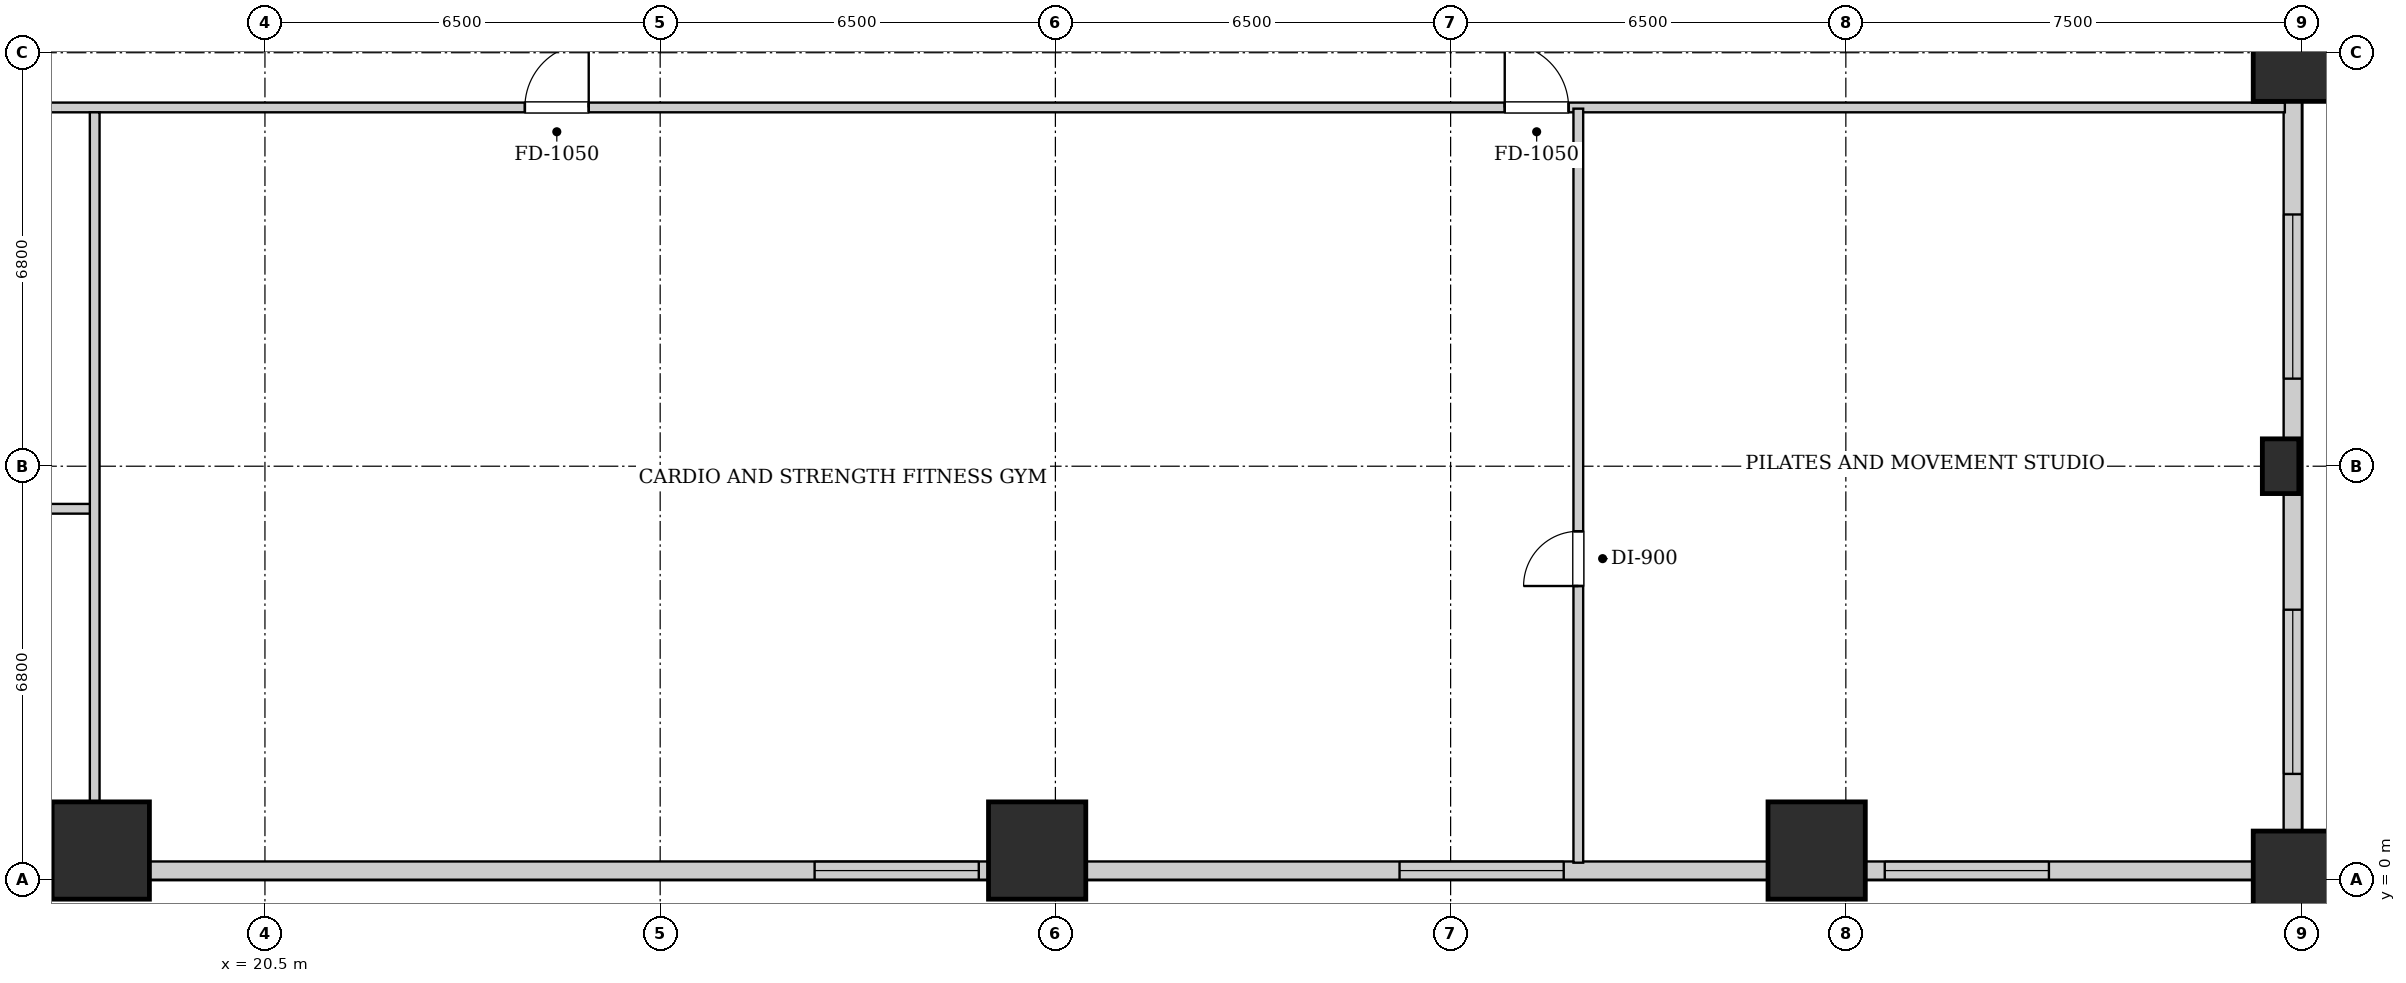
"""IFC4 building model, lengths in metres.
Left out: names, types, materials, properties, quantities, classifications, styles, units other than length and angle.
Written with IfcOpenShell. Run it as: python <this file> out.ifc"""

import sys

from ifc_helpers import new_model, si_unit, direction, frame, frame_2d, origin, origin_2d, place, context, subcontext, project, spatial, rectangle, extrude, element, fill, save


model = new_model("IFC4")
c1 = context("Model", 3, precision=1e-05, world=origin(), true_north=direction((0.0, 1.0)))
c2 = subcontext(c1, "Body", "Model", "MODEL_VIEW")
j1 = project(units=[si_unit("LENGTHUNIT", "METRE"), si_unit("PLANEANGLEUNIT", "RADIAN")], contexts=[c1])
p1 = place(None, origin())
s1 = spatial("IfcSite", under=j1, at=p1, CompositionType="ELEMENT")
p2 = place(p1, origin())
s2 = spatial("IfcBuilding", under=s1, at=p2, CompositionType="ELEMENT")
p3 = place(p2, frame((0.0, 0.0, 16.0)))
s3 = spatial("IfcBuildingStorey", under=s2, at=p3, CompositionType="ELEMENT", Elevation=16.0)
for number, where, z_axis, x_axis in (
    (1, (54.0, 0.0, 0.0), (0.0, 0.0, 1.0), (1.0, 0.0, 0.0)),
    (2, (54.0, 13.6, 0.0), (0.0, 0.0, 1.0), (1.0, 0.0, 0.0)),
    (3, (46.02, 0.48, 0.0), (0.0, 0.0, 1.0), (1.0, 0.0, 0.0)),
    (4, (17.8, 0.48, 0.0), (0.0, 0.0, 1.0), (1.0, 0.0, 0.0)),
    (5, (33.2, 0.48, 0.0), (0.0, 0.0, 1.0), (1.0, 0.0, 0.0)),
):
    element("IfcColumn", number, at=place(p3, frame(where, z_axis=z_axis, x_axis=x_axis)), inside=s3, PredefinedType="COLUMN", context=c2, shape_type="SweptSolid", body=[
        extrude(rectangle(XDim=1.6, YDim=1.6, at=origin_2d()), origin(), (0.0, 0.0, 1.0), 4.8),
    ])
p4 = place(p3, frame((53.65, 6.8, 0.0), z_axis=(0.0, 0.0, 1.0), x_axis=(1.0, 0.0, 0.0)))
e6 = element("IfcColumn", 6, at=p4, inside=s3, PredefinedType="PILASTER", context=c2, shape_type="SweptSolid", body=[
    extrude(rectangle(XDim=0.6, YDim=0.9, at=origin_2d()), origin(), (0.0, 0.0, 1.0), 4.8),
])
p5 = place(p3, frame((53.85, 47.44, 0.0), z_axis=(0.0, 0.0, 1.0), x_axis=(0.0, -1.0, 0.0)))
e7 = element("IfcWall", 7, at=p5, inside=s3, PredefinedType="SOLIDWALL", context=c2, shape_type="SweptSolid", body=[
    extrude(rectangle(XDim=47.28, YDim=0.3, at=frame_2d((23.64, 0.0))), origin(), (0.0, 0.0, 1.0), 3.235),
])
p6 = place(p5, frame((3.33, 0.0, 0.9)))
e8 = element("IfcOpeningElement", 8, at=p6, cuts=e7, PredefinedType="OPENING", context=c2, shape_type="SweptSolid", body=[
    extrude(rectangle(XDim=2.7, YDim=2.1, at=frame_2d((1.35, 1.05))), frame((0.0, 0.16, 0.0), z_axis=(0.0, -1.0, 0.0), x_axis=(1.0, 0.0, 0.0)), (0.0, 0.0, 1.0), 0.32),
])
p7 = place(p5, frame((9.78, 0.0, 0.9)))
e9 = element("IfcOpeningElement", 9, at=p7, cuts=e7, PredefinedType="OPENING", context=c2, shape_type="SweptSolid", body=[
    extrude(rectangle(XDim=2.7, YDim=2.1, at=frame_2d((1.35, 1.05))), frame((0.0, 0.16, 0.0), z_axis=(0.0, -1.0, 0.0), x_axis=(1.0, 0.0, 0.0)), (0.0, 0.0, 1.0), 0.32),
])
p8 = place(p5, frame((21.2, 0.0, 0.55)))
e10 = element("IfcOpeningElement", 10, at=p8, cuts=e7, PredefinedType="OPENING", context=c2, shape_type="SweptSolid", body=[
    extrude(rectangle(XDim=1.35, YDim=1.2, at=frame_2d((0.675, 0.6))), frame((0.0, 0.16, 0.0), z_axis=(0.0, -1.0, 0.0), x_axis=(1.0, 0.0, 0.0)), (0.0, 0.0, 1.0), 0.32),
])
p9 = place(p5, frame((36.5, 0.0, 0.9)))
e11 = element("IfcOpeningElement", 11, at=p9, cuts=e7, PredefinedType="OPENING", context=c2, shape_type="SweptSolid", body=[
    extrude(rectangle(XDim=2.7, YDim=2.1, at=frame_2d((1.35, 1.05))), frame((0.0, 0.16, 0.0), z_axis=(0.0, -1.0, 0.0), x_axis=(1.0, 0.0, 0.0)), (0.0, 0.0, 1.0), 0.32),
])
p10 = place(p5, frame((43.0, 0.0, 0.9)))
e12 = element("IfcOpeningElement", 12, at=p10, cuts=e7, PredefinedType="OPENING", context=c2, shape_type="SweptSolid", body=[
    extrude(rectangle(XDim=2.7, YDim=2.1, at=frame_2d((1.35, 1.05))), frame((0.0, 0.16, 0.0), z_axis=(0.0, -1.0, 0.0), x_axis=(1.0, 0.0, 0.0)), (0.0, 0.0, 1.0), 0.32),
])
p11 = place(p3, frame((53.84, 0.15, 0.0), z_axis=(0.0, 0.0, 1.0), x_axis=(-1.0, 0.0, 0.0)))
e13 = element("IfcWall", 13, at=p11, inside=s3, PredefinedType="SOLIDWALL", context=c2, shape_type="SweptSolid", body=[
    extrude(rectangle(XDim=53.68, YDim=0.3, at=frame_2d((26.84, 0.0))), origin(), (0.0, 0.0, 1.0), 3.235),
])
p12 = place(p11, frame((4.0, 0.0, 0.9)))
e14 = element("IfcOpeningElement", 14, at=p12, cuts=e13, PredefinedType="OPENING", context=c2, shape_type="SweptSolid", body=[
    extrude(rectangle(XDim=2.7, YDim=2.1, at=frame_2d((1.35, 1.05))), frame((0.0, 0.16, 0.0), z_axis=(0.0, -1.0, 0.0), x_axis=(1.0, 0.0, 0.0)), (0.0, 0.0, 1.0), 0.32),
])
p13 = place(p11, frame((11.98, 0.0, 0.9)))
e15 = element("IfcOpeningElement", 15, at=p13, cuts=e13, PredefinedType="OPENING", context=c2, shape_type="SweptSolid", body=[
    extrude(rectangle(XDim=2.7, YDim=2.1, at=frame_2d((1.35, 1.05))), frame((0.0, 0.16, 0.0), z_axis=(0.0, -1.0, 0.0), x_axis=(1.0, 0.0, 0.0)), (0.0, 0.0, 1.0), 0.32),
])
p14 = place(p11, frame((21.6, 0.0, 0.9)))
e16 = element("IfcOpeningElement", 16, at=p14, cuts=e13, PredefinedType="OPENING", context=c2, shape_type="SweptSolid", body=[
    extrude(rectangle(XDim=2.7, YDim=2.1, at=frame_2d((1.35, 1.05))), frame((0.0, 0.16, 0.0), z_axis=(0.0, -1.0, 0.0), x_axis=(1.0, 0.0, 0.0)), (0.0, 0.0, 1.0), 0.32),
])
p15 = place(p11, frame((37.0, 0.0, 0.9)))
e17 = element("IfcOpeningElement", 17, at=p15, cuts=e13, PredefinedType="OPENING", context=c2, shape_type="SweptSolid", body=[
    extrude(rectangle(XDim=2.7, YDim=2.1, at=frame_2d((1.35, 1.05))), frame((0.0, 0.16, 0.0), z_axis=(0.0, -1.0, 0.0), x_axis=(1.0, 0.0, 0.0)), (0.0, 0.0, 1.0), 0.32),
])
p16 = place(p11, frame((42.2, 0.0, 0.9)))
e18 = element("IfcOpeningElement", 18, at=p16, cuts=e13, PredefinedType="OPENING", context=c2, shape_type="SweptSolid", body=[
    extrude(rectangle(XDim=2.7, YDim=2.1, at=frame_2d((1.35, 1.05))), frame((0.0, 0.16, 0.0), z_axis=(0.0, -1.0, 0.0), x_axis=(1.0, 0.0, 0.0)), (0.0, 0.0, 1.0), 0.32),
])
p17 = place(p3, frame((5.8, 12.7, 0.0), z_axis=(0.0, 0.0, 1.0), x_axis=(1.0, 0.0, 0.0)))
e19 = element("IfcWall", 19, at=p17, inside=s3, PredefinedType="PARTITIONING", context=c2, shape_type="SweptSolid", body=[
    extrude(rectangle(XDim=47.92, YDim=0.16, at=frame_2d((23.96, 0.0))), origin(), (0.0, 0.0, 1.0), 4.35),
])
p18 = place(p17, frame((3.8, 0.0, 0.0)))
e20 = element("IfcOpeningElement", 20, at=p18, cuts=e19, PredefinedType="OPENING", context=c2, shape_type="SweptSolid", body=[
    extrude(rectangle(XDim=0.9, YDim=2.05, at=frame_2d((0.45, 1.025))), frame((0.0, 0.09, 0.0), z_axis=(0.0, -1.0, 0.0), x_axis=(1.0, 0.0, 0.0)), (0.0, 0.0, 1.0), 0.18),
])
p19 = place(p17, frame((9.32, 0.0, 0.0)))
e21 = element("IfcOpeningElement", 21, at=p19, cuts=e19, PredefinedType="OPENING", context=c2, shape_type="SweptSolid", body=[
    extrude(rectangle(XDim=0.86, YDim=2.05, at=frame_2d((0.43, 1.025))), frame((0.0, 0.09, 0.0), z_axis=(0.0, -1.0, 0.0), x_axis=(1.0, 0.0, 0.0)), (0.0, 0.0, 1.0), 0.18),
])
p20 = place(p17, frame((18.975, 0.0, 0.0)))
e22 = element("IfcOpeningElement", 22, at=p20, cuts=e19, PredefinedType="OPENING", context=c2, shape_type="SweptSolid", body=[
    extrude(rectangle(XDim=1.05, YDim=2.05, at=frame_2d((0.525, 1.025))), frame((0.0, 0.09, 0.0), z_axis=(0.0, -1.0, 0.0), x_axis=(1.0, 0.0, 0.0)), (0.0, 0.0, 1.0), 0.18),
])
p21 = place(p17, frame((35.09, 0.0, 0.0)))
e23 = element("IfcOpeningElement", 23, at=p21, cuts=e19, PredefinedType="OPENING", context=c2, shape_type="SweptSolid", body=[
    extrude(rectangle(XDim=1.05, YDim=2.05, at=frame_2d((0.525, 1.025))), frame((0.0, 0.09, 0.0), z_axis=(0.0, -1.0, 0.0), x_axis=(1.0, 0.0, 0.0)), (0.0, 0.0, 1.0), 0.18),
])
p22 = place(p3, frame((6.18, 6.1, 0.0), z_axis=(0.0, 0.0, 1.0), x_axis=(1.0, 0.0, 0.0)))
e24 = element("IfcWall", 24, at=p22, inside=s3, PredefinedType="PARTITIONING", context=c2, shape_type="SweptSolid", body=[
    extrude(rectangle(XDim=11.5, YDim=0.16, at=frame_2d((5.75, 0.0))), origin(), (0.0, 0.0, 1.0), 4.35),
])
p23 = place(p3, frame((17.7, 0.6, 0.0), z_axis=(0.0, 0.0, 1.0), x_axis=(0.0, 1.0, 0.0)))
e25 = element("IfcWall", 25, at=p23, inside=s3, PredefinedType="PARTITIONING", context=c2, shape_type="SweptSolid", body=[
    extrude(rectangle(XDim=12.02, YDim=0.16, at=frame_2d((6.01, 0.0))), origin(), (0.0, 0.0, 1.0), 3.435),
])
p24 = place(p3, frame((42.1, 0.28, 0.0), z_axis=(0.0, 0.0, 1.0), x_axis=(0.0, 1.0, 0.0)))
e26 = element("IfcWall", 26, at=p24, inside=s3, PredefinedType="PARTITIONING", context=c2, shape_type="SweptSolid", body=[
    extrude(rectangle(XDim=12.4, YDim=0.16, at=frame_2d((6.2, 0.0))), origin(), (0.0, 0.0, 1.0), 4.35),
])
p25 = place(p24, frame((4.55, 0.0, 0.0)))
e27 = element("IfcOpeningElement", 27, at=p25, cuts=e26, PredefinedType="OPENING", context=c2, shape_type="SweptSolid", body=[
    extrude(rectangle(XDim=0.9, YDim=2.05, at=frame_2d((0.45, 1.025))), frame((0.0, 0.09, 0.0), z_axis=(0.0, -1.0, 0.0), x_axis=(1.0, 0.0, 0.0)), (0.0, 0.0, 1.0), 0.18),
])
p26 = place(p20, origin())
e28 = element("IfcDoor", 28, at=p26, inside=s3, OperationType="SINGLE_SWING_RIGHT", PredefinedType="DOOR", context=c2, shape_type="SweptSolid", body=[
    extrude(rectangle(XDim=1.05, YDim=2.05, at=frame_2d((0.525, 1.025))), frame((0.0, 0.025, 0.0), z_axis=(0.0, -1.0, 0.0), x_axis=(1.0, 0.0, 0.0)), (0.0, 0.0, 1.0), 0.05),
])
fill(e22, e28)
p27 = place(p21, origin())
e29 = element("IfcDoor", 29, at=p27, inside=s3, OperationType="SINGLE_SWING_LEFT", PredefinedType="DOOR", context=c2, shape_type="SweptSolid", body=[
    extrude(rectangle(XDim=1.05, YDim=2.05, at=frame_2d((0.525, 1.025))), frame((0.0, 0.025, 0.0), z_axis=(0.0, -1.0, 0.0), x_axis=(1.0, 0.0, 0.0)), (0.0, 0.0, 1.0), 0.05),
])
fill(e23, e29)
p28 = place(p25, origin())
e30 = element("IfcDoor", 30, at=p28, inside=s3, OperationType="SINGLE_SWING_LEFT", PredefinedType="DOOR", context=c2, shape_type="SweptSolid", body=[
    extrude(rectangle(XDim=0.9, YDim=2.05, at=frame_2d((0.45, 1.025))), frame((0.0, 0.025, 0.0), z_axis=(0.0, -1.0, 0.0), x_axis=(1.0, 0.0, 0.0)), (0.0, 0.0, 1.0), 0.05),
])
fill(e27, e30)
p29 = place(p9, origin())
e31 = element("IfcWindow", 31, at=p29, inside=s3, PartitioningType="TRIPLE_PANEL_VERTICAL", PredefinedType="WINDOW", context=c2, shape_type="SweptSolid", body=[
    extrude(rectangle(XDim=2.7, YDim=2.1, at=frame_2d((1.35, 1.05))), frame((0.0, 0.03, 0.0), z_axis=(0.0, -1.0, 0.0), x_axis=(1.0, 0.0, 0.0)), (0.0, 0.0, 1.0), 0.06),
])
fill(e11, e31)
p30 = place(p10, origin())
e32 = element("IfcWindow", 32, at=p30, inside=s3, PartitioningType="TRIPLE_PANEL_VERTICAL", PredefinedType="WINDOW", context=c2, shape_type="SweptSolid", body=[
    extrude(rectangle(XDim=2.7, YDim=2.1, at=frame_2d((1.35, 1.05))), frame((0.0, 0.03, 0.0), z_axis=(0.0, -1.0, 0.0), x_axis=(1.0, 0.0, 0.0)), (0.0, 0.0, 1.0), 0.06),
])
fill(e12, e32)
p31 = place(p12, origin())
e33 = element("IfcWindow", 33, at=p31, inside=s3, PartitioningType="TRIPLE_PANEL_VERTICAL", PredefinedType="WINDOW", context=c2, shape_type="SweptSolid", body=[
    extrude(rectangle(XDim=2.7, YDim=2.1, at=frame_2d((1.35, 1.05))), frame((0.0, 0.03, 0.0), z_axis=(0.0, -1.0, 0.0), x_axis=(1.0, 0.0, 0.0)), (0.0, 0.0, 1.0), 0.06),
])
fill(e14, e33)
p32 = place(p13, origin())
e34 = element("IfcWindow", 34, at=p32, inside=s3, PartitioningType="TRIPLE_PANEL_VERTICAL", PredefinedType="WINDOW", context=c2, shape_type="SweptSolid", body=[
    extrude(rectangle(XDim=2.7, YDim=2.1, at=frame_2d((1.35, 1.05))), frame((0.0, 0.03, 0.0), z_axis=(0.0, -1.0, 0.0), x_axis=(1.0, 0.0, 0.0)), (0.0, 0.0, 1.0), 0.06),
])
fill(e15, e34)
p33 = place(p14, origin())
e35 = element("IfcWindow", 35, at=p33, inside=s3, PartitioningType="TRIPLE_PANEL_VERTICAL", PredefinedType="WINDOW", context=c2, shape_type="SweptSolid", body=[
    extrude(rectangle(XDim=2.7, YDim=2.1, at=frame_2d((1.35, 1.05))), frame((0.0, 0.03, 0.0), z_axis=(0.0, -1.0, 0.0), x_axis=(1.0, 0.0, 0.0)), (0.0, 0.0, 1.0), 0.06),
])
fill(e16, e35)
save(model, sys.argv[1])
